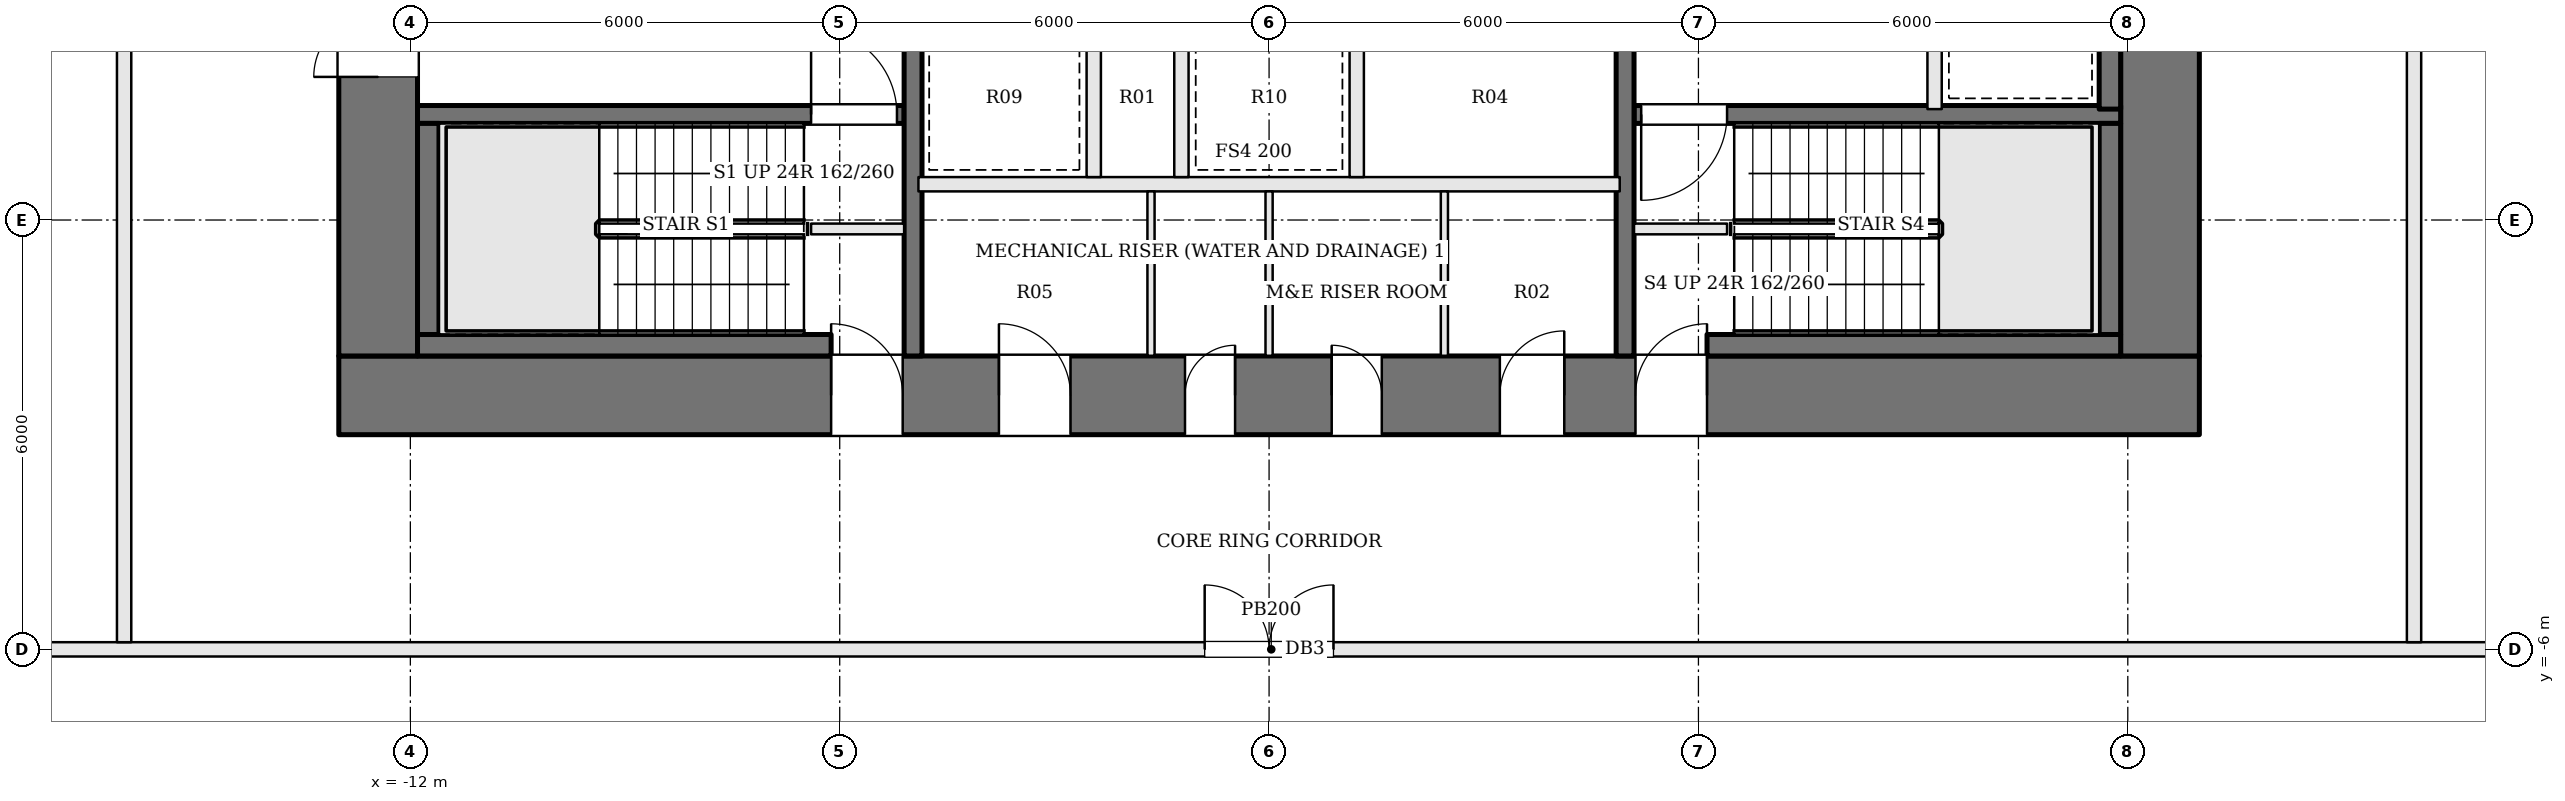
"""IFC4 building model, lengths in metres.
Left out: names, types, materials, properties, quantities, classifications, styles, units other than length and angle.
Written with IfcOpenShell. Run it as: python <this file> out.ifc"""

import sys

from ifc_helpers import new_model, si_unit, direction, frame, frame_2d, origin, place, context, subcontext, project, spatial, rectangle, extrude, element, fill, save


model = new_model("IFC4")
c1 = context("Model", 3, precision=1e-05, world=origin(), true_north=direction((0.0, 1.0)))
c2 = subcontext(c1, "Body", "Model", "MODEL_VIEW")
j1 = project(units=[si_unit("LENGTHUNIT", "METRE"), si_unit("PLANEANGLEUNIT", "RADIAN")], contexts=[c1])
p1 = place(None, origin())
s1 = spatial("IfcSite", under=j1, at=p1, CompositionType="ELEMENT")
p2 = place(p1, origin())
s2 = spatial("IfcBuilding", under=s1, at=p2, CompositionType="ELEMENT")
p3 = place(p2, frame((0.0, 0.0, 150.0)))
s3 = spatial("IfcBuildingStorey", under=s2, at=p3, CompositionType="ELEMENT", Elevation=150.0)
p4 = place(p3, frame((-13.0, -2.45, 0.0), z_axis=(0.0, 0.0, 1.0), x_axis=(1.0, 0.0, 0.0)))
e1 = element("IfcWall", 1, at=p4, inside=s3, PredefinedType="SHEAR", context=c2, shape_type="SweptSolid", body=[
    extrude(rectangle(XDim=26.0, YDim=1.1, at=frame_2d((13.0, 0.0))), origin(), (0.0, 0.0, 1.0), 3.9),
])
p5 = place(p4, frame((9.225, 0.0, 0.0)))
e2 = element("IfcOpeningElement", 2, at=p5, cuts=e1, PredefinedType="OPENING", context=c2, shape_type="SweptSolid", body=[
    extrude(rectangle(XDim=1.0, YDim=2.1, at=frame_2d((0.5, 1.05))), frame((0.0, 0.56, 0.0), z_axis=(0.0, -1.0, 0.0), x_axis=(1.0, 0.0, 0.0)), (0.0, 0.0, 1.0), 1.12),
])
p6 = place(p4, frame((11.825, 0.0, 0.0)))
e3 = element("IfcOpeningElement", 3, at=p6, cuts=e1, PredefinedType="OPENING", context=c2, shape_type="SweptSolid", body=[
    extrude(rectangle(XDim=0.7, YDim=2.1, at=frame_2d((0.35, 1.05))), frame((0.0, 0.56, 0.0), z_axis=(0.0, -1.0, 0.0), x_axis=(1.0, 0.0, 0.0)), (0.0, 0.0, 1.0), 1.12),
])
p7 = place(p4, frame((13.875, 0.0, 0.0)))
e4 = element("IfcOpeningElement", 4, at=p7, cuts=e1, PredefinedType="OPENING", context=c2, shape_type="SweptSolid", body=[
    extrude(rectangle(XDim=0.7, YDim=2.1, at=frame_2d((0.35, 1.05))), frame((0.0, 0.56, 0.0), z_axis=(0.0, -1.0, 0.0), x_axis=(1.0, 0.0, 0.0)), (0.0, 0.0, 1.0), 1.12),
])
p8 = place(p4, frame((16.225, 0.0, 0.0)))
e5 = element("IfcOpeningElement", 5, at=p8, cuts=e1, PredefinedType="OPENING", context=c2, shape_type="SweptSolid", body=[
    extrude(rectangle(XDim=0.9, YDim=2.1, at=frame_2d((0.45, 1.05))), frame((0.0, 0.56, 0.0), z_axis=(0.0, -1.0, 0.0), x_axis=(1.0, 0.0, 0.0)), (0.0, 0.0, 1.0), 1.12),
])
p9 = place(p4, frame((6.88, 0.0, 0.0)))
e6 = element("IfcOpeningElement", 6, at=p9, cuts=e1, PredefinedType="OPENING", context=c2, shape_type="SweptSolid", body=[
    extrude(rectangle(XDim=1.0, YDim=2.1, at=frame_2d((0.5, 1.05))), frame((0.0, 0.56, 0.0), z_axis=(0.0, -1.0, 0.0), x_axis=(1.0, 0.0, 0.0)), (0.0, 0.0, 1.0), 1.12),
])
p10 = place(p4, frame((18.12, 0.0, 0.0)))
e7 = element("IfcOpeningElement", 7, at=p10, cuts=e1, PredefinedType="OPENING", context=c2, shape_type="SweptSolid", body=[
    extrude(rectangle(XDim=1.0, YDim=2.1, at=frame_2d((0.5, 1.05))), frame((0.0, 0.56, 0.0), z_axis=(0.0, -1.0, 0.0), x_axis=(1.0, 0.0, 0.0)), (0.0, 0.0, 1.0), 1.12),
])
p11 = place(p3, frame((12.45, -1.9, 0.0), z_axis=(0.0, 0.0, 1.0), x_axis=(0.0, 1.0, 0.0)))
e8 = element("IfcWall", 8, at=p11, inside=s3, PredefinedType="SHEAR", context=c2, shape_type="SweptSolid", body=[
    extrude(rectangle(XDim=12.8, YDim=1.1, at=frame_2d((6.4, 0.0))), origin(), (0.0, 0.0, 1.0), 3.9),
])
p12 = place(p11, frame((7.1, 0.0, 0.0)))
e9 = element("IfcOpeningElement", 9, at=p12, cuts=e8, PredefinedType="OPENING", context=c2, shape_type="SweptSolid", body=[
    extrude(rectangle(XDim=1.8, YDim=2.1, at=frame_2d((0.9, 1.05))), frame((0.0, 0.56, 0.0), z_axis=(0.0, -1.0, 0.0), x_axis=(1.0, 0.0, 0.0)), (0.0, 0.0, 1.0), 1.12),
])
p13 = place(p3, frame((-12.45, -1.9, 0.0), z_axis=(0.0, 0.0, 1.0), x_axis=(0.0, 1.0, 0.0)))
e10 = element("IfcWall", 10, at=p13, inside=s3, PredefinedType="SHEAR", context=c2, shape_type="SweptSolid", body=[
    extrude(rectangle(XDim=12.8, YDim=1.1, at=frame_2d((6.4, 0.0))), origin(), (0.0, 0.0, 1.0), 3.9),
])
p14 = place(p13, frame((3.9, 0.0, 0.0)))
e11 = element("IfcOpeningElement", 11, at=p14, cuts=e10, PredefinedType="OPENING", context=c2, shape_type="SweptSolid", body=[
    extrude(rectangle(XDim=1.8, YDim=2.1, at=frame_2d((0.9, 1.05))), frame((0.0, 0.56, 0.0), z_axis=(0.0, -1.0, 0.0), x_axis=(1.0, 0.0, 0.0)), (0.0, 0.0, 1.0), 1.12),
])
for number, where, z_axis, x_axis in (
    (12, (-6.4, -0.125, 0.0), (0.0, 0.0, 1.0), (1.0, 0.0, 0.0)),
    (13, (6.4, -0.125, 0.0), (0.0, 0.0, 1.0), (-1.0, 0.0, 0.0)),
):
    element("IfcWall", number, at=place(p3, frame(where, z_axis=z_axis, x_axis=x_axis)), inside=s3, PredefinedType="SOLIDWALL", context=c2, shape_type="SweptSolid", body=[
        extrude(rectangle(XDim=1.3, YDim=0.15, at=frame_2d((0.65, 0.0))), origin(), (0.0, 0.0, 1.0), 3.7),
    ])
p15 = place(p3, frame((-11.9, 1.475, 0.0), z_axis=(0.0, 0.0, 1.0), x_axis=(1.0, 0.0, 0.0)))
e14 = element("IfcWall", 14, at=p15, inside=s3, PredefinedType="SOLIDWALL", context=c2, shape_type="SweptSolid", body=[
    extrude(rectangle(XDim=6.8, YDim=0.25, at=frame_2d((3.4, 0.0))), origin(), (0.0, 0.0, 1.0), 3.7),
])
p16 = place(p15, frame((5.5, 0.0, 0.0)))
e15 = element("IfcOpeningElement", 15, at=p16, cuts=e14, PredefinedType="OPENING", context=c2, shape_type="SweptSolid", body=[
    extrude(rectangle(XDim=1.2, YDim=2.1, at=frame_2d((0.6, 1.05))), frame((0.0, 0.135, 0.0), z_axis=(0.0, -1.0, 0.0), x_axis=(1.0, 0.0, 0.0)), (0.0, 0.0, 1.0), 0.27),
])
p17 = place(p3, frame((11.9, 1.475, 0.0), z_axis=(0.0, 0.0, 1.0), x_axis=(-1.0, 0.0, 0.0)))
e16 = element("IfcWall", 16, at=p17, inside=s3, PredefinedType="SOLIDWALL", context=c2, shape_type="SweptSolid", body=[
    extrude(rectangle(XDim=6.8, YDim=0.25, at=frame_2d((3.4, 0.0))), origin(), (0.0, 0.0, 1.0), 3.7),
])
p18 = place(p17, frame((5.5, 0.0, 0.0)))
e17 = element("IfcOpeningElement", 17, at=p18, cuts=e16, PredefinedType="OPENING", context=c2, shape_type="SweptSolid", body=[
    extrude(rectangle(XDim=1.2, YDim=2.1, at=frame_2d((0.6, 1.05))), frame((0.0, 0.135, 0.0), z_axis=(0.0, -1.0, 0.0), x_axis=(1.0, 0.0, 0.0)), (0.0, 0.0, 1.0), 0.27),
])
p19 = place(p3, frame((9.3, 4.55, 0.0), z_axis=(0.0, 0.0, 1.0), x_axis=(0.0, -1.0, 0.0)))
e18 = element("IfcWall", 18, at=p19, inside=s3, PredefinedType="SOLIDWALL", context=c2, shape_type="SweptSolid", body=[
    extrude(rectangle(XDim=3.0, YDim=0.2, at=frame_2d((1.5, 0.0))), origin(), (0.0, 0.0, 1.0), 3.7),
])
p20 = place(p3, frame((-4.975, -1.9, 0.0), z_axis=(0.0, 0.0, 1.0), x_axis=(0.0, 1.0, 0.0)))
e19 = element("IfcWall", 19, at=p20, inside=s3, PredefinedType="SOLIDWALL", context=c2, shape_type="SweptSolid", body=[
    extrude(rectangle(XDim=12.8, YDim=0.25, at=frame_2d((6.4, 0.0))), origin(), (0.0, 0.0, 1.0), 3.7),
])
p21 = place(p20, frame((4.95, 0.0, 0.0)))
e20 = element("IfcOpeningElement", 20, at=p21, cuts=e19, PredefinedType="OPENING", context=c2, shape_type="SweptSolid", body=[
    extrude(rectangle(XDim=1.2, YDim=2.1, at=frame_2d((0.6, 1.05))), frame((0.0, 0.135, 0.0), z_axis=(0.0, -1.0, 0.0), x_axis=(1.0, 0.0, 0.0)), (0.0, 0.0, 1.0), 0.27),
])
p22 = place(p3, frame((4.975, 10.9, 0.0), z_axis=(0.0, 0.0, 1.0), x_axis=(0.0, -1.0, 0.0)))
e21 = element("IfcWall", 21, at=p22, inside=s3, PredefinedType="SOLIDWALL", context=c2, shape_type="SweptSolid", body=[
    extrude(rectangle(XDim=12.8, YDim=0.25, at=frame_2d((6.4, 0.0))), origin(), (0.0, 0.0, 1.0), 3.7),
])
p23 = place(p22, frame((4.95, 0.0, 0.0)))
e22 = element("IfcOpeningElement", 22, at=p23, cuts=e21, PredefinedType="OPENING", context=c2, shape_type="SweptSolid", body=[
    extrude(rectangle(XDim=1.2, YDim=2.1, at=frame_2d((0.6, 1.05))), frame((0.0, 0.135, 0.0), z_axis=(0.0, -1.0, 0.0), x_axis=(1.0, 0.0, 0.0)), (0.0, 0.0, 1.0), 0.27),
])
p24 = place(p3, frame((-11.9, -1.75, 0.0), z_axis=(0.0, 0.0, 1.0), x_axis=(1.0, 0.0, 0.0)))
e23 = element("IfcWall", 23, at=p24, inside=s3, PredefinedType="SOLIDWALL", context=c2, shape_type="SweptSolid", body=[
    extrude(rectangle(XDim=5.78, YDim=0.3, at=frame_2d((2.89, 0.0))), origin(), (0.0, 0.0, 1.0), 3.7),
])
p25 = place(p3, frame((-11.75, -1.6, 0.0), z_axis=(0.0, 0.0, 1.0), x_axis=(0.0, 1.0, 0.0)))
e24 = element("IfcWall", 24, at=p25, inside=s3, PredefinedType="SOLIDWALL", context=c2, shape_type="SweptSolid", body=[
    extrude(rectangle(XDim=2.95, YDim=0.3, at=frame_2d((1.475, 0.0))), origin(), (0.0, 0.0, 1.0), 3.7),
])
p26 = place(p3, frame((11.75, 4.55, 0.0), z_axis=(0.0, 0.0, 1.0), x_axis=(0.0, -1.0, 0.0)))
e25 = element("IfcWall", 25, at=p26, inside=s3, PredefinedType="SOLIDWALL", context=c2, shape_type="SweptSolid", body=[
    extrude(rectangle(XDim=3.0, YDim=0.3, at=frame_2d((1.5, 0.0))), origin(), (0.0, 0.0, 1.0), 3.7),
])
p27 = place(p3, frame((11.75, 1.35, 0.0), z_axis=(0.0, 0.0, 1.0), x_axis=(0.0, -1.0, 0.0)))
e26 = element("IfcWall", 26, at=p27, inside=s3, PredefinedType="SOLIDWALL", context=c2, shape_type="SweptSolid", body=[
    extrude(rectangle(XDim=2.95, YDim=0.3, at=frame_2d((1.475, 0.0))), origin(), (0.0, 0.0, 1.0), 3.7),
])
p28 = place(p3, frame((11.9, -1.75, 0.0), z_axis=(0.0, 0.0, 1.0), x_axis=(-1.0, 0.0, 0.0)))
e27 = element("IfcWall", 27, at=p28, inside=s3, PredefinedType="SOLIDWALL", context=c2, shape_type="SweptSolid", body=[
    extrude(rectangle(XDim=5.78, YDim=0.3, at=frame_2d((2.89, 0.0))), origin(), (0.0, 0.0, 1.0), 3.7),
])
p29 = place(p3, frame((-4.9, 0.5, 0.0), z_axis=(0.0, 0.0, 1.0), x_axis=(1.0, 0.0, 0.0)))
e28 = element("IfcWall", 28, at=p29, inside=s3, PredefinedType="SOLIDWALL", context=c2, shape_type="SweptSolid", body=[
    extrude(rectangle(XDim=9.8, YDim=0.2, at=frame_2d((4.9, 0.0))), origin(), (0.0, 0.0, 1.0), 3.7),
])
for number, where, z_axis, x_axis in (
    (29, (-2.45, 0.6, 0.0), (0.0, 0.0, 1.0), (0.0, 1.0, 0.0)),
    (30, (-1.225, 0.6, 0.0), (0.0, 0.0, 1.0), (0.0, 1.0, 0.0)),
    (31, (1.225, 0.6, 0.0), (0.0, 0.0, 1.0), (0.0, 1.0, 0.0)),
):
    element("IfcWall", number, at=place(p3, frame(where, z_axis=z_axis, x_axis=x_axis)), inside=s3, PredefinedType="SOLIDWALL", context=c2, shape_type="SweptSolid", body=[
        extrude(rectangle(XDim=2.2, YDim=0.2, at=frame_2d((1.1, 0.0))), origin(), (0.0, 0.0, 1.0), 3.7),
    ])
for number, where, z_axis, x_axis in (
    (32, (-1.65, -1.9, 0.0), (0.0, 0.0, 1.0), (0.0, 1.0, 0.0)),
    (33, (0.0, -1.9, 0.0), (0.0, 0.0, 1.0), (0.0, 1.0, 0.0)),
    (34, (2.45, -1.9, 0.0), (0.0, 0.0, 1.0), (0.0, 1.0, 0.0)),
):
    element("IfcWall", number, at=place(p3, frame(where, z_axis=z_axis, x_axis=x_axis)), inside=s3, PredefinedType="PARTITIONING", context=c2, shape_type="SweptSolid", body=[
        extrude(rectangle(XDim=2.3, YDim=0.1, at=frame_2d((1.15, 0.0))), origin(), (0.0, 0.0, 1.0), 3.7),
    ])
p30 = place(p3, frame((19.849, -6.895, 0.0), z_axis=(0.0, 0.0, 1.0), x_axis=(-0.618811760178, -0.785539308669, 0.0)))
e35 = element("IfcWall", 35, at=p30, inside=s3, PredefinedType="PARTITIONING", context=c2, shape_type="SweptSolid", body=[
    extrude(rectangle(XDim=4.756, YDim=0.2, at=frame_2d((2.378, 0.0))), origin(), (0.0, 0.0, 1.0), 3.7),
])
p31 = place(p3, frame((-19.977, -6.0, 0.0), z_axis=(0.0, 0.0, 1.0), x_axis=(1.0, 0.0, 0.0)))
e36 = element("IfcWall", 36, at=p31, inside=s3, PredefinedType="PARTITIONING", context=c2, shape_type="SweptSolid", body=[
    extrude(rectangle(XDim=40.015, YDim=0.2, at=frame_2d((20.008, 0.0))), origin(), (0.0, 0.0, 1.0), 3.7),
])
p32 = place(p31, frame((19.077, 0.0, 0.0)))
e37 = element("IfcOpeningElement", 37, at=p32, cuts=e36, PredefinedType="OPENING", context=c2, shape_type="SweptSolid", body=[
    extrude(rectangle(XDim=1.8, YDim=2.1, at=frame_2d((0.9, 1.05))), frame((0.0, 0.11, 0.0), z_axis=(0.0, -1.0, 0.0), x_axis=(1.0, 0.0, 0.0)), (0.0, 0.0, 1.0), 0.22),
])
p33 = place(p3, frame((-16.0, 11.053, 0.0), z_axis=(0.0, 0.0, 1.0), x_axis=(0.0, -1.0, 0.0)))
e38 = element("IfcWall", 38, at=p33, inside=s3, PredefinedType="PARTITIONING", context=c2, shape_type="SweptSolid", body=[
    extrude(rectangle(XDim=16.953, YDim=0.2, at=frame_2d((8.477, 0.0))), origin(), (0.0, 0.0, 1.0), 3.7),
])
p34 = place(p33, frame((6.077, 0.0, 0.0)))
e39 = element("IfcOpeningElement", 39, at=p34, cuts=e38, PredefinedType="OPENING", context=c2, shape_type="SweptSolid", body=[
    extrude(rectangle(XDim=1.8, YDim=2.1, at=frame_2d((0.9, 1.05))), frame((0.0, 0.11, 0.0), z_axis=(0.0, -1.0, 0.0), x_axis=(1.0, 0.0, 0.0)), (0.0, 0.0, 1.0), 0.22),
])
p35 = place(p3, frame((16.0, -5.9, 0.0), z_axis=(0.0, 0.0, 1.0), x_axis=(0.0, 1.0, 0.0)))
e40 = element("IfcWall", 40, at=p35, inside=s3, PredefinedType="PARTITIONING", context=c2, shape_type="SweptSolid", body=[
    extrude(rectangle(XDim=17.017, YDim=0.2, at=frame_2d((8.508, 0.0))), origin(), (0.0, 0.0, 1.0), 3.7),
])
p36 = place(p35, frame((9.108, 0.0, 0.0)))
e41 = element("IfcOpeningElement", 41, at=p36, cuts=e40, PredefinedType="OPENING", context=c2, shape_type="SweptSolid", body=[
    extrude(rectangle(XDim=1.8, YDim=2.1, at=frame_2d((0.9, 1.05))), frame((0.0, 0.11, 0.0), z_axis=(0.0, -1.0, 0.0), x_axis=(1.0, 0.0, 0.0)), (0.0, 0.0, 1.0), 0.22),
])
p37 = place(p14, origin())
e42 = element("IfcDoor", 42, at=p37, inside=s3, OperationType="DOUBLE_DOOR_SINGLE_SWING", PredefinedType="DOOR", context=c2, shape_type="SweptSolid", body=[
    extrude(rectangle(XDim=1.8, YDim=2.1, at=frame_2d((0.9, 1.05))), frame((0.0, 0.025, 0.0), z_axis=(0.0, -1.0, 0.0), x_axis=(1.0, 0.0, 0.0)), (0.0, 0.0, 1.0), 0.05),
])
fill(e11, e42)
p38 = place(p16, origin())
e43 = element("IfcDoor", 43, at=p38, inside=s3, OperationType="SINGLE_SWING_LEFT", PredefinedType="DOOR", context=c2, shape_type="SweptSolid", body=[
    extrude(rectangle(XDim=1.2, YDim=2.1, at=frame_2d((0.6, 1.05))), frame((0.0, 0.025, 0.0), z_axis=(0.0, -1.0, 0.0), x_axis=(1.0, 0.0, 0.0)), (0.0, 0.0, 1.0), 0.05),
])
fill(e15, e43)
p39 = place(p18, origin())
e44 = element("IfcDoor", 44, at=p39, inside=s3, OperationType="SINGLE_SWING_RIGHT", PredefinedType="DOOR", context=c2, shape_type="SweptSolid", body=[
    extrude(rectangle(XDim=1.2, YDim=2.1, at=frame_2d((0.6, 1.05))), frame((0.0, 0.025, 0.0), z_axis=(0.0, -1.0, 0.0), x_axis=(1.0, 0.0, 0.0)), (0.0, 0.0, 1.0), 0.05),
])
fill(e17, e44)
p40 = place(p5, origin())
e45 = element("IfcDoor", 45, at=p40, inside=s3, OperationType="SINGLE_SWING_LEFT", PredefinedType="DOOR", context=c2, shape_type="SweptSolid", body=[
    extrude(rectangle(XDim=1.0, YDim=2.1, at=frame_2d((0.5, 1.05))), frame((0.0, 0.025, 0.0), z_axis=(0.0, -1.0, 0.0), x_axis=(1.0, 0.0, 0.0)), (0.0, 0.0, 1.0), 0.05),
])
fill(e2, e45)
p41 = place(p6, origin())
e46 = element("IfcDoor", 46, at=p41, inside=s3, OperationType="SINGLE_SWING_RIGHT", PredefinedType="DOOR", context=c2, shape_type="SweptSolid", body=[
    extrude(rectangle(XDim=0.7, YDim=2.1, at=frame_2d((0.35, 1.05))), frame((0.0, 0.025, 0.0), z_axis=(0.0, -1.0, 0.0), x_axis=(1.0, 0.0, 0.0)), (0.0, 0.0, 1.0), 0.05),
])
fill(e3, e46)
p42 = place(p7, origin())
e47 = element("IfcDoor", 47, at=p42, inside=s3, OperationType="SINGLE_SWING_LEFT", PredefinedType="DOOR", context=c2, shape_type="SweptSolid", body=[
    extrude(rectangle(XDim=0.7, YDim=2.1, at=frame_2d((0.35, 1.05))), frame((0.0, 0.025, 0.0), z_axis=(0.0, -1.0, 0.0), x_axis=(1.0, 0.0, 0.0)), (0.0, 0.0, 1.0), 0.05),
])
fill(e4, e47)
p43 = place(p8, origin())
e48 = element("IfcDoor", 48, at=p43, inside=s3, OperationType="SINGLE_SWING_RIGHT", PredefinedType="DOOR", context=c2, shape_type="SweptSolid", body=[
    extrude(rectangle(XDim=0.9, YDim=2.1, at=frame_2d((0.45, 1.05))), frame((0.0, 0.025, 0.0), z_axis=(0.0, -1.0, 0.0), x_axis=(1.0, 0.0, 0.0)), (0.0, 0.0, 1.0), 0.05),
])
fill(e5, e48)
p44 = place(p9, origin())
e49 = element("IfcDoor", 49, at=p44, inside=s3, OperationType="SINGLE_SWING_LEFT", PredefinedType="DOOR", context=c2, shape_type="SweptSolid", body=[
    extrude(rectangle(XDim=1.0, YDim=2.1, at=frame_2d((0.5, 1.05))), frame((0.0, 0.025, 0.0), z_axis=(0.0, -1.0, 0.0), x_axis=(1.0, 0.0, 0.0)), (0.0, 0.0, 1.0), 0.05),
])
fill(e6, e49)
p45 = place(p10, origin())
e50 = element("IfcDoor", 50, at=p45, inside=s3, OperationType="SINGLE_SWING_RIGHT", PredefinedType="DOOR", context=c2, shape_type="SweptSolid", body=[
    extrude(rectangle(XDim=1.0, YDim=2.1, at=frame_2d((0.5, 1.05))), frame((0.0, 0.025, 0.0), z_axis=(0.0, -1.0, 0.0), x_axis=(1.0, 0.0, 0.0)), (0.0, 0.0, 1.0), 0.05),
])
fill(e7, e50)
p46 = place(p32, origin())
e51 = element("IfcDoor", 51, at=p46, inside=s3, OperationType="DOUBLE_DOOR_SINGLE_SWING", PredefinedType="DOOR", context=c2, shape_type="SweptSolid", body=[
    extrude(rectangle(XDim=1.8, YDim=2.1, at=frame_2d((0.9, 1.05))), frame((0.0, 0.025, 0.0), z_axis=(0.0, -1.0, 0.0), x_axis=(1.0, 0.0, 0.0)), (0.0, 0.0, 1.0), 0.05),
])
fill(e37, e51)
save(model, sys.argv[1])
